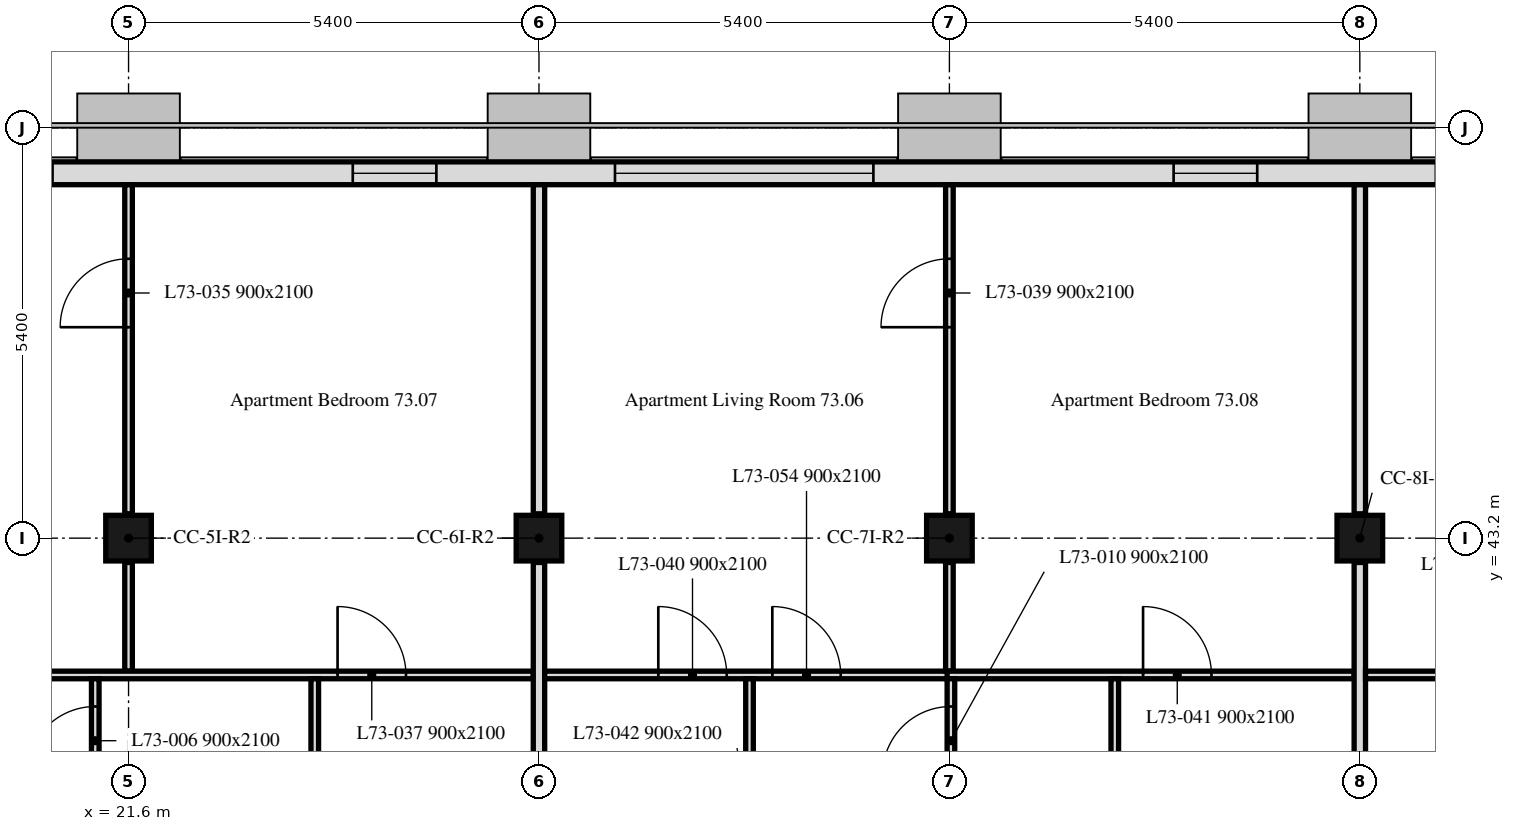
"""IFC4 building model, lengths in metres.
Left out: names, types, materials, properties, quantities, classifications, styles, units other than length and angle.
Written with IfcOpenShell. Run it as: python <this file> out.ifc"""

import sys

from ifc_helpers import new_model, si_unit, direction, frame, frame_2d, origin, origin_2d, place, context, subcontext, project, spatial, rectangle, extrude, element, fill, save


model = new_model("IFC4")
c1 = context("Model", 3, precision=1e-05, world=origin(), true_north=direction((0.0, 1.0)))
c2 = subcontext(c1, "Body", "Model", "MODEL_VIEW")
j1 = project(units=[si_unit("LENGTHUNIT", "METRE"), si_unit("PLANEANGLEUNIT", "RADIAN")], contexts=[c1])
p1 = place(None, origin())
s1 = spatial("IfcSite", under=j1, at=p1, CompositionType="ELEMENT")
p2 = place(p1, origin())
s2 = spatial("IfcBuilding", under=s1, at=p2, CompositionType="ELEMENT")
p3 = place(p2, frame((0.0, 0.0, 295.0)))
s3 = spatial("IfcBuildingStorey", under=s2, at=p3, CompositionType="ELEMENT", Elevation=295.0)
for number, where, z_axis, x_axis in (
    (1, (21.6, 43.2, 0.0), (0.0, 0.0, 1.0), (1.0, 0.0, 0.0)),
    (2, (27.0, 43.2, 0.0), (0.0, 0.0, 1.0), (1.0, 0.0, 0.0)),
    (3, (32.4, 43.2, 0.0), (0.0, 0.0, 1.0), (1.0, 0.0, 0.0)),
    (4, (37.8, 43.2, 0.0), (0.0, 0.0, 1.0), (1.0, 0.0, 0.0)),
):
    element("IfcColumn", number, at=place(p3, frame(where, z_axis=z_axis, x_axis=x_axis)), inside=s3, PredefinedType="COLUMN", context=c2, shape_type="SweptSolid", body=[
        extrude(rectangle(XDim=0.6, YDim=0.6, at=origin_2d()), origin(), (0.0, 0.0, 1.0), 3.0),
    ])
p4 = place(p3, frame((43.014, 48.0, 0.0), z_axis=(0.0, 0.0, 1.0), x_axis=(-1.0, 0.0, 0.0)))
e5 = element("IfcWall", 5, at=p4, inside=s3, PredefinedType="SOLIDWALL", context=c2, shape_type="SweptSolid", body=[
    extrude(rectangle(XDim=32.027, YDim=0.3, at=frame_2d((16.014, 0.0))), origin(), (0.0, 0.0, 1.0), 3.0),
])
p5 = place(p4, frame((0.814, 0.0, 0.9)))
e6 = element("IfcOpeningElement", 6, at=p5, cuts=e5, PredefinedType="OPENING", context=c2, shape_type="SweptSolid", body=[
    extrude(rectangle(XDim=3.4, YDim=1.7, at=frame_2d((1.7, 0.85))), frame((0.0, 0.16, 0.0), z_axis=(0.0, -1.0, 0.0), x_axis=(1.0, 0.0, 0.0)), (0.0, 0.0, 1.0), 0.32),
])
p6 = place(p4, frame((6.564, 0.0, 0.9)))
e7 = element("IfcOpeningElement", 7, at=p6, cuts=e5, PredefinedType="OPENING", context=c2, shape_type="SweptSolid", body=[
    extrude(rectangle(XDim=1.1, YDim=1.7, at=frame_2d((0.55, 0.85))), frame((0.0, 0.16, 0.0), z_axis=(0.0, -1.0, 0.0), x_axis=(1.0, 0.0, 0.0)), (0.0, 0.0, 1.0), 0.32),
])
p7 = place(p4, frame((11.614, 0.0, 0.9)))
e8 = element("IfcOpeningElement", 8, at=p7, cuts=e5, PredefinedType="OPENING", context=c2, shape_type="SweptSolid", body=[
    extrude(rectangle(XDim=3.4, YDim=1.7, at=frame_2d((1.7, 0.85))), frame((0.0, 0.16, 0.0), z_axis=(0.0, -1.0, 0.0), x_axis=(1.0, 0.0, 0.0)), (0.0, 0.0, 1.0), 0.32),
])
p8 = place(p4, frame((17.364, 0.0, 0.9)))
e9 = element("IfcOpeningElement", 9, at=p8, cuts=e5, PredefinedType="OPENING", context=c2, shape_type="SweptSolid", body=[
    extrude(rectangle(XDim=1.1, YDim=1.7, at=frame_2d((0.55, 0.85))), frame((0.0, 0.16, 0.0), z_axis=(0.0, -1.0, 0.0), x_axis=(1.0, 0.0, 0.0)), (0.0, 0.0, 1.0), 0.32),
])
p9 = place(p4, frame((22.414, 0.0, 0.9)))
e10 = element("IfcOpeningElement", 10, at=p9, cuts=e5, PredefinedType="OPENING", context=c2, shape_type="SweptSolid", body=[
    extrude(rectangle(XDim=3.4, YDim=1.7, at=frame_2d((1.7, 0.85))), frame((0.0, 0.16, 0.0), z_axis=(0.0, -1.0, 0.0), x_axis=(1.0, 0.0, 0.0)), (0.0, 0.0, 1.0), 0.32),
])
p10 = place(p4, frame((28.164, 0.0, 0.9)))
e11 = element("IfcOpeningElement", 11, at=p10, cuts=e5, PredefinedType="OPENING", context=c2, shape_type="SweptSolid", body=[
    extrude(rectangle(XDim=1.1, YDim=1.7, at=frame_2d((0.55, 0.85))), frame((0.0, 0.16, 0.0), z_axis=(0.0, -1.0, 0.0), x_axis=(1.0, 0.0, 0.0)), (0.0, 0.0, 1.0), 0.32),
])
p11 = place(p3, frame((21.6, 41.45, 0.0), z_axis=(0.0, 0.0, 1.0), x_axis=(0.0, 1.0, 0.0)))
e12 = element("IfcWall", 12, at=p11, inside=s3, PredefinedType="PARTITIONING", context=c2, shape_type="SweptSolid", body=[
    extrude(rectangle(XDim=1.43, YDim=0.1, at=frame_2d((0.715, 0.0))), origin(), (0.0, 0.0, 1.0), 2.4),
])
p12 = place(p3, frame((21.6, 43.52, 0.0), z_axis=(0.0, 0.0, 1.0), x_axis=(0.0, 1.0, 0.0)))
e13 = element("IfcWall", 13, at=p12, inside=s3, PredefinedType="PARTITIONING", context=c2, shape_type="SweptSolid", body=[
    extrude(rectangle(XDim=4.329, YDim=0.1, at=frame_2d((2.165, 0.0))), origin(), (0.0, 0.0, 1.0), 2.4),
])
p13 = place(p12, frame((2.455, 0.0, 0.0)))
e14 = element("IfcOpeningElement", 14, at=p13, cuts=e13, PredefinedType="OPENING", context=c2, shape_type="SweptSolid", body=[
    extrude(rectangle(XDim=0.9, YDim=2.1, at=frame_2d((0.45, 1.05))), frame((0.0, 0.05, 0.0), z_axis=(0.0, -1.0, 0.0), x_axis=(1.0, 0.0, 0.0)), (0.0, 0.0, 1.0), 0.1),
])
p14 = place(p3, frame((16.275, 41.4, 0.0), z_axis=(0.0, 0.0, 1.0), x_axis=(1.0, 0.0, 0.0)))
e15 = element("IfcWall", 15, at=p14, inside=s3, PredefinedType="PARTITIONING", context=c2, shape_type="SweptSolid", body=[
    extrude(rectangle(XDim=10.65, YDim=0.1, at=frame_2d((5.325, 0.0))), origin(), (0.0, 0.0, 1.0), 2.4),
])
p15 = place(p14, frame((0.937, 0.0, 0.0)))
e16 = element("IfcOpeningElement", 16, at=p15, cuts=e15, PredefinedType="OPENING", context=c2, shape_type="SweptSolid", body=[
    extrude(rectangle(XDim=0.9, YDim=2.1, at=frame_2d((0.45, 1.05))), frame((0.0, 0.05, 0.0), z_axis=(0.0, -1.0, 0.0), x_axis=(1.0, 0.0, 0.0)), (0.0, 0.0, 1.0), 0.1),
])
p16 = place(p14, frame((8.075, 0.0, 0.0)))
e17 = element("IfcOpeningElement", 17, at=p16, cuts=e15, PredefinedType="OPENING", context=c2, shape_type="SweptSolid", body=[
    extrude(rectangle(XDim=0.9, YDim=2.1, at=frame_2d((0.45, 1.05))), frame((0.0, 0.05, 0.0), z_axis=(0.0, -1.0, 0.0), x_axis=(1.0, 0.0, 0.0)), (0.0, 0.0, 1.0), 0.1),
])
p17 = place(p14, frame((2.437, 0.0, 0.0)))
e18 = element("IfcOpeningElement", 18, at=p17, cuts=e15, PredefinedType="OPENING", context=c2, shape_type="SweptSolid", body=[
    extrude(rectangle(XDim=0.9, YDim=2.1, at=frame_2d((0.45, 1.05))), frame((0.0, 0.05, 0.0), z_axis=(0.0, -1.0, 0.0), x_axis=(1.0, 0.0, 0.0)), (0.0, 0.0, 1.0), 0.1),
])
p18 = place(p3, frame((27.0, 43.52, 0.0), z_axis=(0.0, 0.0, 1.0), x_axis=(0.0, 1.0, 0.0)))
e19 = element("IfcWall", 19, at=p18, inside=s3, PredefinedType="PARTITIONING", context=c2, shape_type="SweptSolid", body=[
    extrude(rectangle(XDim=4.329, YDim=0.15, at=frame_2d((2.165, 0.0))), origin(), (0.0, 0.0, 1.0), 2.4),
])
p19 = place(p3, frame((21.162, 34.725, 0.0), z_axis=(0.0, 0.0, 1.0), x_axis=(0.0, 1.0, 0.0)))
e20 = element("IfcWall", 20, at=p19, inside=s3, PredefinedType="PARTITIONING", context=c2, shape_type="SweptSolid", body=[
    extrude(rectangle(XDim=6.625, YDim=0.1, at=frame_2d((3.312, 0.0))), origin(), (0.0, 0.0, 1.0), 3.0),
])
p20 = place(p19, frame((5.36, 0.0, 0.0)))
e21 = element("IfcOpeningElement", 21, at=p20, cuts=e20, PredefinedType="OPENING", context=c2, shape_type="SweptSolid", body=[
    extrude(rectangle(XDim=0.9, YDim=2.1, at=frame_2d((0.45, 1.05))), frame((0.0, 0.05, 0.0), z_axis=(0.0, -1.0, 0.0), x_axis=(1.0, 0.0, 0.0)), (0.0, 0.0, 1.0), 0.1),
])
p21 = place(p19, frame((0.25, 0.0, 0.0)))
e22 = element("IfcOpeningElement", 22, at=p21, cuts=e20, PredefinedType="OPENING", context=c2, shape_type="SweptSolid", body=[
    extrude(rectangle(XDim=0.9, YDim=2.1, at=frame_2d((0.45, 1.05))), frame((0.0, 0.05, 0.0), z_axis=(0.0, -1.0, 0.0), x_axis=(1.0, 0.0, 0.0)), (0.0, 0.0, 1.0), 0.1),
])
p22 = place(p3, frame((24.05, 37.2, 0.0), z_axis=(0.0, 0.0, 1.0), x_axis=(0.0, 1.0, 0.0)))
e23 = element("IfcWall", 23, at=p22, inside=s3, PredefinedType="PARTITIONING", context=c2, shape_type="SweptSolid", body=[
    extrude(rectangle(XDim=4.15, YDim=0.1, at=frame_2d((2.075, 0.0))), origin(), (0.0, 0.0, 1.0), 3.0),
])
p23 = place(p3, frame((27.0, 38.12, 0.0), z_axis=(0.0, 0.0, 1.0), x_axis=(0.0, 1.0, 0.0)))
e24 = element("IfcWall", 24, at=p23, inside=s3, PredefinedType="PARTITIONING", context=c2, shape_type="SweptSolid", body=[
    extrude(rectangle(XDim=4.76, YDim=0.15, at=frame_2d((2.38, 0.0))), origin(), (0.0, 0.0, 1.0), 2.4),
])
p24 = place(p3, frame((27.075, 41.4, 0.0), z_axis=(0.0, 0.0, 1.0), x_axis=(1.0, 0.0, 0.0)))
e25 = element("IfcWall", 25, at=p24, inside=s3, PredefinedType="PARTITIONING", context=c2, shape_type="SweptSolid", body=[
    extrude(rectangle(XDim=5.375, YDim=0.1, at=frame_2d((2.688, 0.0))), origin(), (0.0, 0.0, 1.0), 3.0),
])
p25 = place(p24, frame((1.495, 0.0, 0.0)))
e26 = element("IfcOpeningElement", 26, at=p25, cuts=e25, PredefinedType="OPENING", context=c2, shape_type="SweptSolid", body=[
    extrude(rectangle(XDim=0.9, YDim=2.1, at=frame_2d((0.45, 1.05))), frame((0.0, 0.05, 0.0), z_axis=(0.0, -1.0, 0.0), x_axis=(1.0, 0.0, 0.0)), (0.0, 0.0, 1.0), 0.1),
])
p26 = place(p24, frame((2.995, 0.0, 0.0)))
e27 = element("IfcOpeningElement", 27, at=p26, cuts=e25, PredefinedType="OPENING", context=c2, shape_type="SweptSolid", body=[
    extrude(rectangle(XDim=0.9, YDim=2.1, at=frame_2d((0.45, 1.05))), frame((0.0, 0.05, 0.0), z_axis=(0.0, -1.0, 0.0), x_axis=(1.0, 0.0, 0.0)), (0.0, 0.0, 1.0), 0.1),
])
p27 = place(p3, frame((32.4, 41.45, 0.0), z_axis=(0.0, 0.0, 1.0), x_axis=(0.0, 1.0, 0.0)))
e28 = element("IfcWall", 28, at=p27, inside=s3, PredefinedType="PARTITIONING", context=c2, shape_type="SweptSolid", body=[
    extrude(rectangle(XDim=1.43, YDim=0.1, at=frame_2d((0.715, 0.0))), origin(), (0.0, 0.0, 1.0), 2.4),
])
p28 = place(p3, frame((32.4, 43.52, 0.0), z_axis=(0.0, 0.0, 1.0), x_axis=(0.0, 1.0, 0.0)))
e29 = element("IfcWall", 29, at=p28, inside=s3, PredefinedType="PARTITIONING", context=c2, shape_type="SweptSolid", body=[
    extrude(rectangle(XDim=4.329, YDim=0.1, at=frame_2d((2.165, 0.0))), origin(), (0.0, 0.0, 1.0), 2.4),
])
p29 = place(p28, frame((2.455, 0.0, 0.0)))
e30 = element("IfcOpeningElement", 30, at=p29, cuts=e29, PredefinedType="OPENING", context=c2, shape_type="SweptSolid", body=[
    extrude(rectangle(XDim=0.9, YDim=2.1, at=frame_2d((0.45, 1.05))), frame((0.0, 0.05, 0.0), z_axis=(0.0, -1.0, 0.0), x_axis=(1.0, 0.0, 0.0)), (0.0, 0.0, 1.0), 0.1),
])
p30 = place(p3, frame((32.37, 41.4, 0.0), z_axis=(0.0, 0.0, 1.0), x_axis=(1.0, 0.0, 0.0)))
e31 = element("IfcWall", 31, at=p30, inside=s3, PredefinedType="PARTITIONING", context=c2, shape_type="SweptSolid", body=[
    extrude(rectangle(XDim=5.355, YDim=0.1, at=frame_2d((2.677, 0.0))), origin(), (0.0, 0.0, 1.0), 3.0),
])
p31 = place(p30, frame((2.578, 0.0, 0.0)))
e32 = element("IfcOpeningElement", 32, at=p31, cuts=e31, PredefinedType="OPENING", context=c2, shape_type="SweptSolid", body=[
    extrude(rectangle(XDim=0.9, YDim=2.1, at=frame_2d((0.45, 1.05))), frame((0.0, 0.05, 0.0), z_axis=(0.0, -1.0, 0.0), x_axis=(1.0, 0.0, 0.0)), (0.0, 0.0, 1.0), 0.1),
])
p32 = place(p3, frame((37.8, 43.52, 0.0), z_axis=(0.0, 0.0, 1.0), x_axis=(0.0, 1.0, 0.0)))
e33 = element("IfcWall", 33, at=p32, inside=s3, PredefinedType="PARTITIONING", context=c2, shape_type="SweptSolid", body=[
    extrude(rectangle(XDim=4.329, YDim=0.15, at=frame_2d((2.165, 0.0))), origin(), (0.0, 0.0, 1.0), 2.4),
])
p33 = place(p3, frame((29.77, 34.725, 0.0), z_axis=(0.0, 0.0, 1.0), x_axis=(0.0, 1.0, 0.0)))
e34 = element("IfcWall", 34, at=p33, inside=s3, PredefinedType="PARTITIONING", context=c2, shape_type="SweptSolid", body=[
    extrude(rectangle(XDim=6.625, YDim=0.1, at=frame_2d((3.312, 0.0))), origin(), (0.0, 0.0, 1.0), 3.0),
])
p34 = place(p33, frame((0.725, 0.0, 0.0)))
e35 = element("IfcOpeningElement", 35, at=p34, cuts=e34, PredefinedType="OPENING", context=c2, shape_type="SweptSolid", body=[
    extrude(rectangle(XDim=0.9, YDim=2.1, at=frame_2d((0.45, 1.05))), frame((0.0, 0.05, 0.0), z_axis=(0.0, -1.0, 0.0), x_axis=(1.0, 0.0, 0.0)), (0.0, 0.0, 1.0), 0.1),
])
p35 = place(p33, frame((4.1, 0.0, 0.0)))
e36 = element("IfcOpeningElement", 36, at=p35, cuts=e34, PredefinedType="OPENING", context=c2, shape_type="SweptSolid", body=[
    extrude(rectangle(XDim=0.9, YDim=2.1, at=frame_2d((0.45, 1.05))), frame((0.0, 0.05, 0.0), z_axis=(0.0, -1.0, 0.0), x_axis=(1.0, 0.0, 0.0)), (0.0, 0.0, 1.0), 0.1),
])
p36 = place(p3, frame((32.42, 38.12, 0.0), z_axis=(0.0, 0.0, 1.0), x_axis=(0.0, 1.0, 0.0)))
e37 = element("IfcWall", 37, at=p36, inside=s3, PredefinedType="PARTITIONING", context=c2, shape_type="SweptSolid", body=[
    extrude(rectangle(XDim=3.23, YDim=0.1, at=frame_2d((1.615, 0.0))), origin(), (0.0, 0.0, 1.0), 2.4),
])
p37 = place(p36, frame((1.965, 0.0, 0.0)))
e38 = element("IfcOpeningElement", 38, at=p37, cuts=e37, PredefinedType="OPENING", context=c2, shape_type="SweptSolid", body=[
    extrude(rectangle(XDim=0.9, YDim=2.1, at=frame_2d((0.45, 1.05))), frame((0.0, 0.05, 0.0), z_axis=(0.0, -1.0, 0.0), x_axis=(1.0, 0.0, 0.0)), (0.0, 0.0, 1.0), 0.1),
])
p38 = place(p3, frame((34.576, 37.2, 0.0), z_axis=(0.0, 0.0, 1.0), x_axis=(0.0, 1.0, 0.0)))
e39 = element("IfcWall", 39, at=p38, inside=s3, PredefinedType="PARTITIONING", context=c2, shape_type="SweptSolid", body=[
    extrude(rectangle(XDim=4.15, YDim=0.1, at=frame_2d((2.075, 0.0))), origin(), (0.0, 0.0, 1.0), 2.4),
])
p39 = place(p3, frame((37.8, 38.12, 0.0), z_axis=(0.0, 0.0, 1.0), x_axis=(0.0, 1.0, 0.0)))
e40 = element("IfcWall", 40, at=p39, inside=s3, PredefinedType="PARTITIONING", context=c2, shape_type="SweptSolid", body=[
    extrude(rectangle(XDim=4.76, YDim=0.15, at=frame_2d((2.38, 0.0))), origin(), (0.0, 0.0, 1.0), 2.4),
])
p40 = place(p3, frame((37.875, 41.4, 0.0), z_axis=(0.0, 0.0, 1.0), x_axis=(1.0, 0.0, 0.0)))
e41 = element("IfcWall", 41, at=p40, inside=s3, PredefinedType="PARTITIONING", context=c2, shape_type="SweptSolid", body=[
    extrude(rectangle(XDim=9.974, YDim=0.1, at=frame_2d((4.987, 0.0))), origin(), (0.0, 0.0, 1.0), 3.0),
])
p41 = place(p40, frame((1.256, 0.0, 0.0)))
e42 = element("IfcOpeningElement", 42, at=p41, cuts=e41, PredefinedType="OPENING", context=c2, shape_type="SweptSolid", body=[
    extrude(rectangle(XDim=0.9, YDim=2.1, at=frame_2d((0.45, 1.05))), frame((0.0, 0.05, 0.0), z_axis=(0.0, -1.0, 0.0), x_axis=(1.0, 0.0, 0.0)), (0.0, 0.0, 1.0), 0.1),
])
p42 = place(p40, frame((7.995, 0.0, 0.0)))
e43 = element("IfcOpeningElement", 43, at=p42, cuts=e41, PredefinedType="OPENING", context=c2, shape_type="SweptSolid", body=[
    extrude(rectangle(XDim=0.9, YDim=2.1, at=frame_2d((0.45, 1.05))), frame((0.0, 0.05, 0.0), z_axis=(0.0, -1.0, 0.0), x_axis=(1.0, 0.0, 0.0)), (0.0, 0.0, 1.0), 0.1),
])
p43 = place(p40, frame((3.29, 0.0, 0.0)))
e44 = element("IfcOpeningElement", 44, at=p43, cuts=e41, PredefinedType="OPENING", context=c2, shape_type="SweptSolid", body=[
    extrude(rectangle(XDim=0.9, YDim=2.1, at=frame_2d((0.45, 1.05))), frame((0.0, 0.05, 0.0), z_axis=(0.0, -1.0, 0.0), x_axis=(1.0, 0.0, 0.0)), (0.0, 0.0, 1.0), 0.1),
])
p44 = place(p6, origin())
e45 = element("IfcWindow", 45, at=p44, inside=s3, PartitioningType="SINGLE_PANEL", PredefinedType="WINDOW", context=c2, shape_type="SweptSolid", body=[
    extrude(rectangle(XDim=1.1, YDim=1.7, at=frame_2d((0.55, 0.85))), frame((0.0, 0.03, 0.0), z_axis=(0.0, -1.0, 0.0), x_axis=(1.0, 0.0, 0.0)), (0.0, 0.0, 1.0), 0.06),
])
fill(e7, e45)
p45 = place(p7, origin())
e46 = element("IfcWindow", 46, at=p45, inside=s3, PartitioningType="SINGLE_PANEL", PredefinedType="WINDOW", context=c2, shape_type="SweptSolid", body=[
    extrude(rectangle(XDim=3.4, YDim=1.7, at=frame_2d((1.7, 0.85))), frame((0.0, 0.03, 0.0), z_axis=(0.0, -1.0, 0.0), x_axis=(1.0, 0.0, 0.0)), (0.0, 0.0, 1.0), 0.06),
])
fill(e8, e46)
p46 = place(p8, origin())
e47 = element("IfcWindow", 47, at=p46, inside=s3, PartitioningType="SINGLE_PANEL", PredefinedType="WINDOW", context=c2, shape_type="SweptSolid", body=[
    extrude(rectangle(XDim=1.1, YDim=1.7, at=frame_2d((0.55, 0.85))), frame((0.0, 0.03, 0.0), z_axis=(0.0, -1.0, 0.0), x_axis=(1.0, 0.0, 0.0)), (0.0, 0.0, 1.0), 0.06),
])
fill(e9, e47)
p47 = place(p20, origin())
e48 = element("IfcDoor", 48, at=p47, inside=s3, OperationType="SINGLE_SWING_LEFT", PredefinedType="DOOR", context=c2, shape_type="SweptSolid", body=[
    extrude(rectangle(XDim=0.9, YDim=2.1, at=frame_2d((0.45, 1.05))), frame((0.0, 0.025, 0.0), z_axis=(0.0, -1.0, 0.0), x_axis=(1.0, 0.0, 0.0)), (0.0, 0.0, 1.0), 0.05),
])
fill(e21, e48)
p48 = place(p37, origin())
e49 = element("IfcDoor", 49, at=p48, inside=s3, OperationType="SINGLE_SWING_RIGHT", PredefinedType="DOOR", context=c2, shape_type="SweptSolid", body=[
    extrude(rectangle(XDim=0.9, YDim=2.1, at=frame_2d((0.45, 1.05))), frame((0.0, 0.025, 0.0), z_axis=(0.0, -1.0, 0.0), x_axis=(1.0, 0.0, 0.0)), (0.0, 0.0, 1.0), 0.05),
])
fill(e38, e49)
p49 = place(p13, origin())
e50 = element("IfcDoor", 50, at=p49, inside=s3, OperationType="SINGLE_SWING_RIGHT", PredefinedType="DOOR", context=c2, shape_type="SweptSolid", body=[
    extrude(rectangle(XDim=0.9, YDim=2.1, at=frame_2d((0.45, 1.05))), frame((0.0, 0.025, 0.0), z_axis=(0.0, -1.0, 0.0), x_axis=(1.0, 0.0, 0.0)), (0.0, 0.0, 1.0), 0.05),
])
fill(e14, e50)
p50 = place(p16, origin())
e51 = element("IfcDoor", 51, at=p50, inside=s3, OperationType="SINGLE_SWING_LEFT", PredefinedType="DOOR", context=c2, shape_type="SweptSolid", body=[
    extrude(rectangle(XDim=0.9, YDim=2.1, at=frame_2d((0.45, 1.05))), frame((0.0, 0.025, 0.0), z_axis=(0.0, -1.0, 0.0), x_axis=(1.0, 0.0, 0.0)), (0.0, 0.0, 1.0), 0.05),
])
fill(e17, e51)
p51 = place(p29, origin())
e52 = element("IfcDoor", 52, at=p51, inside=s3, OperationType="SINGLE_SWING_LEFT", PredefinedType="DOOR", context=c2, shape_type="SweptSolid", body=[
    extrude(rectangle(XDim=0.9, YDim=2.1, at=frame_2d((0.45, 1.05))), frame((0.0, 0.025, 0.0), z_axis=(0.0, -1.0, 0.0), x_axis=(1.0, 0.0, 0.0)), (0.0, 0.0, 1.0), 0.05),
])
fill(e30, e52)
p52 = place(p25, origin())
e53 = element("IfcDoor", 53, at=p52, inside=s3, OperationType="SINGLE_SWING_RIGHT", PredefinedType="DOOR", context=c2, shape_type="SweptSolid", body=[
    extrude(rectangle(XDim=0.9, YDim=2.1, at=frame_2d((0.45, 1.05))), frame((0.0, 0.025, 0.0), z_axis=(0.0, -1.0, 0.0), x_axis=(1.0, 0.0, 0.0)), (0.0, 0.0, 1.0), 0.05),
])
fill(e26, e53)
p53 = place(p31, origin())
e54 = element("IfcDoor", 54, at=p53, inside=s3, OperationType="SINGLE_SWING_LEFT", PredefinedType="DOOR", context=c2, shape_type="SweptSolid", body=[
    extrude(rectangle(XDim=0.9, YDim=2.1, at=frame_2d((0.45, 1.05))), frame((0.0, 0.025, 0.0), z_axis=(0.0, -1.0, 0.0), x_axis=(1.0, 0.0, 0.0)), (0.0, 0.0, 1.0), 0.05),
])
fill(e32, e54)
p54 = place(p26, origin())
e55 = element("IfcDoor", 55, at=p54, inside=s3, OperationType="SINGLE_SWING_LEFT", PredefinedType="DOOR", context=c2, shape_type="SweptSolid", body=[
    extrude(rectangle(XDim=0.9, YDim=2.1, at=frame_2d((0.45, 1.05))), frame((0.0, 0.025, 0.0), z_axis=(0.0, -1.0, 0.0), x_axis=(1.0, 0.0, 0.0)), (0.0, 0.0, 1.0), 0.05),
])
fill(e27, e55)
save(model, sys.argv[1])
